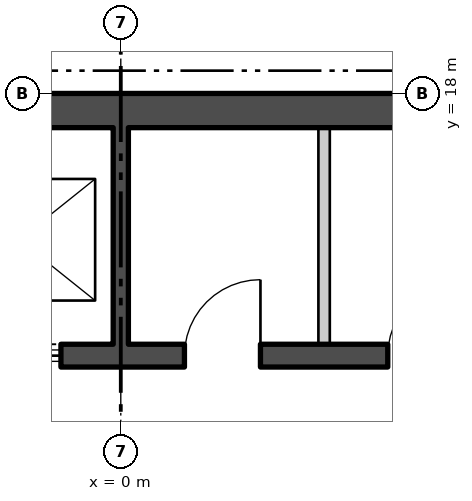
"""IFC4 building model, lengths in metres.
Left out: names, types, materials, properties, quantities, classifications, styles, units other than length and angle.
Written with IfcOpenShell. Run it as: python <this file> out.ifc"""

import sys

from ifc_helpers import new_model, si_unit, direction, frame, frame_2d, origin, place, context, subcontext, project, spatial, polyline, rectangle, outline, extrude, element, fill, save


model = new_model("IFC4")
c1 = context("Model", 3, precision=1e-05, world=origin(), true_north=direction((0.0, 1.0)))
c2 = subcontext(c1, "Body", "Model", "MODEL_VIEW")
j1 = project(units=[si_unit("LENGTHUNIT", "METRE"), si_unit("PLANEANGLEUNIT", "RADIAN")], contexts=[c1])
p1 = place(None, origin())
s1 = spatial("IfcSite", under=j1, at=p1, CompositionType="ELEMENT")
p2 = place(p1, origin())
s2 = spatial("IfcBuilding", under=s1, at=p2, CompositionType="ELEMENT")
p3 = place(p2, frame((0.0, 0.0, 227.7)))
s3 = spatial("IfcBuildingStorey", under=s2, at=p3, CompositionType="ELEMENT", Elevation=227.7)
p4 = place(p3, frame((3.21, -25.189, -0.18), z_axis=(0.0, 0.0, 1.0), x_axis=(0.499999194392, 0.866025868902, 0.0)))
e1 = element("IfcWall", 1, at=p4, inside=s3, PredefinedType="SOLIDWALL", context=c2, shape_type="SweptSolid", body=[
    extrude(outline(polyline([(-0.13, -0.225), (45.86, -0.225), (45.6, 0.225), (0.13, 0.225), (-0.13, -0.225)])), origin(), (0.0, 0.0, 1.0), 3.68),
])
p5 = place(p4, frame((1.424, 0.0, 1.08)))
e2 = element("IfcOpeningElement", 2, at=p5, cuts=e1, PredefinedType="OPENING", context=c2, shape_type="SweptSolid", body=[
    extrude(rectangle(XDim=2.4, YDim=2.0, at=frame_2d((1.2, 1.0))), frame((0.0, 0.235, 0.0), z_axis=(0.0, -1.0, 0.0), x_axis=(1.0, 0.0, 0.0)), (0.0, 0.0, 1.0), 0.47),
])
p6 = place(p4, frame((5.892, 0.0, 1.08)))
e3 = element("IfcOpeningElement", 3, at=p6, cuts=e1, PredefinedType="OPENING", context=c2, shape_type="SweptSolid", body=[
    extrude(rectangle(XDim=2.4, YDim=2.0, at=frame_2d((1.2, 1.0))), frame((0.0, 0.235, 0.0), z_axis=(0.0, -1.0, 0.0), x_axis=(1.0, 0.0, 0.0)), (0.0, 0.0, 1.0), 0.47),
])
p7 = place(p4, frame((10.399, 0.0, 1.08)))
e4 = element("IfcOpeningElement", 4, at=p7, cuts=e1, PredefinedType="OPENING", context=c2, shape_type="SweptSolid", body=[
    extrude(rectangle(XDim=2.4, YDim=2.0, at=frame_2d((1.2, 1.0))), frame((0.0, 0.235, 0.0), z_axis=(0.0, -1.0, 0.0), x_axis=(1.0, 0.0, 0.0)), (0.0, 0.0, 1.0), 0.47),
])
p8 = place(p4, frame((14.905, 0.0, 1.08)))
e5 = element("IfcOpeningElement", 5, at=p8, cuts=e1, PredefinedType="OPENING", context=c2, shape_type="SweptSolid", body=[
    extrude(rectangle(XDim=2.4, YDim=2.0, at=frame_2d((1.2, 1.0))), frame((0.0, 0.235, 0.0), z_axis=(0.0, -1.0, 0.0), x_axis=(1.0, 0.0, 0.0)), (0.0, 0.0, 1.0), 0.47),
])
p9 = place(p4, frame((19.412, 0.0, 1.08)))
e6 = element("IfcOpeningElement", 6, at=p9, cuts=e1, PredefinedType="OPENING", context=c2, shape_type="SweptSolid", body=[
    extrude(rectangle(XDim=2.4, YDim=2.0, at=frame_2d((1.2, 1.0))), frame((0.0, 0.235, 0.0), z_axis=(0.0, -1.0, 0.0), x_axis=(1.0, 0.0, 0.0)), (0.0, 0.0, 1.0), 0.47),
])
p10 = place(p4, frame((23.918, 0.0, 1.08)))
e7 = element("IfcOpeningElement", 7, at=p10, cuts=e1, PredefinedType="OPENING", context=c2, shape_type="SweptSolid", body=[
    extrude(rectangle(XDim=2.4, YDim=2.0, at=frame_2d((1.2, 1.0))), frame((0.0, 0.235, 0.0), z_axis=(0.0, -1.0, 0.0), x_axis=(1.0, 0.0, 0.0)), (0.0, 0.0, 1.0), 0.47),
])
p11 = place(p4, frame((32.932, 0.0, 1.08)))
e8 = element("IfcOpeningElement", 8, at=p11, cuts=e1, PredefinedType="OPENING", context=c2, shape_type="SweptSolid", body=[
    extrude(rectangle(XDim=2.4, YDim=2.0, at=frame_2d((1.2, 1.0))), frame((0.0, 0.235, 0.0), z_axis=(0.0, -1.0, 0.0), x_axis=(1.0, 0.0, 0.0)), (0.0, 0.0, 1.0), 0.47),
])
p12 = place(p4, frame((37.438, 0.0, 1.08)))
e9 = element("IfcOpeningElement", 9, at=p12, cuts=e1, PredefinedType="OPENING", context=c2, shape_type="SweptSolid", body=[
    extrude(rectangle(XDim=2.4, YDim=2.0, at=frame_2d((1.2, 1.0))), frame((0.0, 0.235, 0.0), z_axis=(0.0, -1.0, 0.0), x_axis=(1.0, 0.0, 0.0)), (0.0, 0.0, 1.0), 0.47),
])
p13 = place(p4, frame((41.907, 0.0, 1.08)))
e10 = element("IfcOpeningElement", 10, at=p13, cuts=e1, PredefinedType="OPENING", context=c2, shape_type="SweptSolid", body=[
    extrude(rectangle(XDim=2.4, YDim=2.0, at=frame_2d((1.2, 1.0))), frame((0.0, 0.235, 0.0), z_axis=(0.0, -1.0, 0.0), x_axis=(1.0, 0.0, 0.0)), (0.0, 0.0, 1.0), 0.47),
])
p14 = place(p3, frame((-16.2, 17.775, 0.0), z_axis=(0.0, 0.0, 1.0), x_axis=(1.0, 0.0, 0.0)))
e11 = element("IfcWall", 11, at=p14, inside=s3, PredefinedType="SHEAR", context=c2, shape_type="SweptSolid", body=[
    extrude(rectangle(XDim=32.4, YDim=0.45, at=frame_2d((16.2, 0.0))), origin(), (0.0, 0.0, 1.0), 3.7),
])
p15 = place(p3, frame((-10.7, 14.55, 0.0), z_axis=(0.0, 0.0, 1.0), x_axis=(1.0, 0.0, 0.0)))
e12 = element("IfcWall", 12, at=p15, inside=s3, PredefinedType="SHEAR", context=c2, shape_type="SweptSolid", body=[
    extrude(rectangle(XDim=21.4, YDim=0.3, at=frame_2d((10.7, 0.0))), origin(), (0.0, 0.0, 1.0), 3.7),
])
p16 = place(p15, frame((0.738, 0.0, 0.0)))
e13 = element("IfcOpeningElement", 13, at=p16, cuts=e12, PredefinedType="OPENING", context=c2, shape_type="SweptSolid", body=[
    extrude(rectangle(XDim=1.1, YDim=2.1, at=frame_2d((0.55, 1.05))), frame((0.0, 0.16, 0.0), z_axis=(0.0, -1.0, 0.0), x_axis=(1.0, 0.0, 0.0)), (0.0, 0.0, 1.0), 0.32),
])
p17 = place(p15, frame((3.462, 0.0, 0.0)))
e14 = element("IfcOpeningElement", 14, at=p17, cuts=e12, PredefinedType="OPENING", context=c2, shape_type="SweptSolid", body=[
    extrude(rectangle(XDim=1.1, YDim=2.1, at=frame_2d((0.55, 1.05))), frame((0.0, 0.16, 0.0), z_axis=(0.0, -1.0, 0.0), x_axis=(1.0, 0.0, 0.0)), (0.0, 0.0, 1.0), 0.32),
])
p18 = place(p15, frame((6.138, 0.0, 0.0)))
e15 = element("IfcOpeningElement", 15, at=p18, cuts=e12, PredefinedType="OPENING", context=c2, shape_type="SweptSolid", body=[
    extrude(rectangle(XDim=1.1, YDim=2.1, at=frame_2d((0.55, 1.05))), frame((0.0, 0.16, 0.0), z_axis=(0.0, -1.0, 0.0), x_axis=(1.0, 0.0, 0.0)), (0.0, 0.0, 1.0), 0.32),
])
p19 = place(p15, frame((8.812, 0.0, 0.0)))
e16 = element("IfcOpeningElement", 16, at=p19, cuts=e12, PredefinedType="OPENING", context=c2, shape_type="SweptSolid", body=[
    extrude(rectangle(XDim=1.1, YDim=2.1, at=frame_2d((0.55, 1.05))), frame((0.0, 0.16, 0.0), z_axis=(0.0, -1.0, 0.0), x_axis=(1.0, 0.0, 0.0)), (0.0, 0.0, 1.0), 0.32),
])
p20 = place(p15, frame((19.562, 0.0, 0.0)))
e17 = element("IfcOpeningElement", 17, at=p20, cuts=e12, PredefinedType="OPENING", context=c2, shape_type="SweptSolid", body=[
    extrude(rectangle(XDim=1.1, YDim=2.1, at=frame_2d((0.55, 1.05))), frame((0.0, 0.16, 0.0), z_axis=(0.0, -1.0, 0.0), x_axis=(1.0, 0.0, 0.0)), (0.0, 0.0, 1.0), 0.32),
])
p21 = place(p15, frame((11.537, 0.0, 0.0)))
e18 = element("IfcOpeningElement", 18, at=p21, cuts=e12, PredefinedType="OPENING", context=c2, shape_type="SweptSolid", body=[
    extrude(rectangle(XDim=1.0, YDim=2.1, at=frame_2d((0.5, 1.05))), frame((0.0, 0.16, 0.0), z_axis=(0.0, -1.0, 0.0), x_axis=(1.0, 0.0, 0.0)), (0.0, 0.0, 1.0), 0.32),
])
p22 = place(p15, frame((14.213, 0.0, 0.0)))
e19 = element("IfcOpeningElement", 19, at=p22, cuts=e12, PredefinedType="OPENING", context=c2, shape_type="SweptSolid", body=[
    extrude(rectangle(XDim=1.0, YDim=2.1, at=frame_2d((0.5, 1.05))), frame((0.0, 0.16, 0.0), z_axis=(0.0, -1.0, 0.0), x_axis=(1.0, 0.0, 0.0)), (0.0, 0.0, 1.0), 0.32),
])
p23 = place(p15, frame((16.887, 0.0, 0.0)))
e20 = element("IfcOpeningElement", 20, at=p23, cuts=e12, PredefinedType="OPENING", context=c2, shape_type="SweptSolid", body=[
    extrude(rectangle(XDim=1.0, YDim=2.1, at=frame_2d((0.5, 1.05))), frame((0.0, 0.16, 0.0), z_axis=(0.0, -1.0, 0.0), x_axis=(1.0, 0.0, 0.0)), (0.0, 0.0, 1.0), 0.32),
])
p24 = place(p3, frame((0.0, 14.7, 0.0), z_axis=(0.0, 0.0, 1.0), x_axis=(0.0, 1.0, 0.0)))
e21 = element("IfcWall", 21, at=p24, inside=s3, PredefinedType="SHEAR", context=c2, shape_type="SweptSolid", body=[
    extrude(rectangle(XDim=2.85, YDim=0.2, at=frame_2d((1.425, 0.0))), origin(), (0.0, 0.0, 1.0), 3.7),
])
p25 = place(p3, frame((2.675, 14.7, 0.0), z_axis=(0.0, 0.0, 1.0), x_axis=(0.0, 1.0, 0.0)))
e22 = element("IfcWall", 22, at=p25, inside=s3, PredefinedType="PARTITIONING", context=c2, shape_type="SweptSolid", body=[
    extrude(rectangle(XDim=2.85, YDim=0.15, at=frame_2d((1.425, 0.0))), origin(), (0.0, 0.0, 1.0), 3.7),
])
p26 = place(p19, origin())
e23 = element("IfcDoor", 23, at=p26, inside=s3, OperationType="SLIDING_TO_LEFT", PredefinedType="DOOR", context=c2, shape_type="SweptSolid", body=[
    extrude(rectangle(XDim=1.1, YDim=2.1, at=frame_2d((0.55, 1.05))), frame((0.0, 0.025, 0.0), z_axis=(0.0, -1.0, 0.0), x_axis=(1.0, 0.0, 0.0)), (0.0, 0.0, 1.0), 0.05),
])
fill(e16, e23)
p27 = place(p21, origin())
e24 = element("IfcDoor", 24, at=p27, inside=s3, OperationType="SINGLE_SWING_LEFT", PredefinedType="DOOR", context=c2, shape_type="SweptSolid", body=[
    extrude(rectangle(XDim=1.0, YDim=2.1, at=frame_2d((0.5, 1.05))), frame((0.0, 0.025, 0.0), z_axis=(0.0, -1.0, 0.0), x_axis=(1.0, 0.0, 0.0)), (0.0, 0.0, 1.0), 0.05),
])
fill(e18, e24)
p28 = place(p22, origin())
e25 = element("IfcDoor", 25, at=p28, inside=s3, OperationType="SINGLE_SWING_LEFT", PredefinedType="DOOR", context=c2, shape_type="SweptSolid", body=[
    extrude(rectangle(XDim=1.0, YDim=2.1, at=frame_2d((0.5, 1.05))), frame((0.0, 0.025, 0.0), z_axis=(0.0, -1.0, 0.0), x_axis=(1.0, 0.0, 0.0)), (0.0, 0.0, 1.0), 0.05),
])
fill(e19, e25)
save(model, sys.argv[1])
